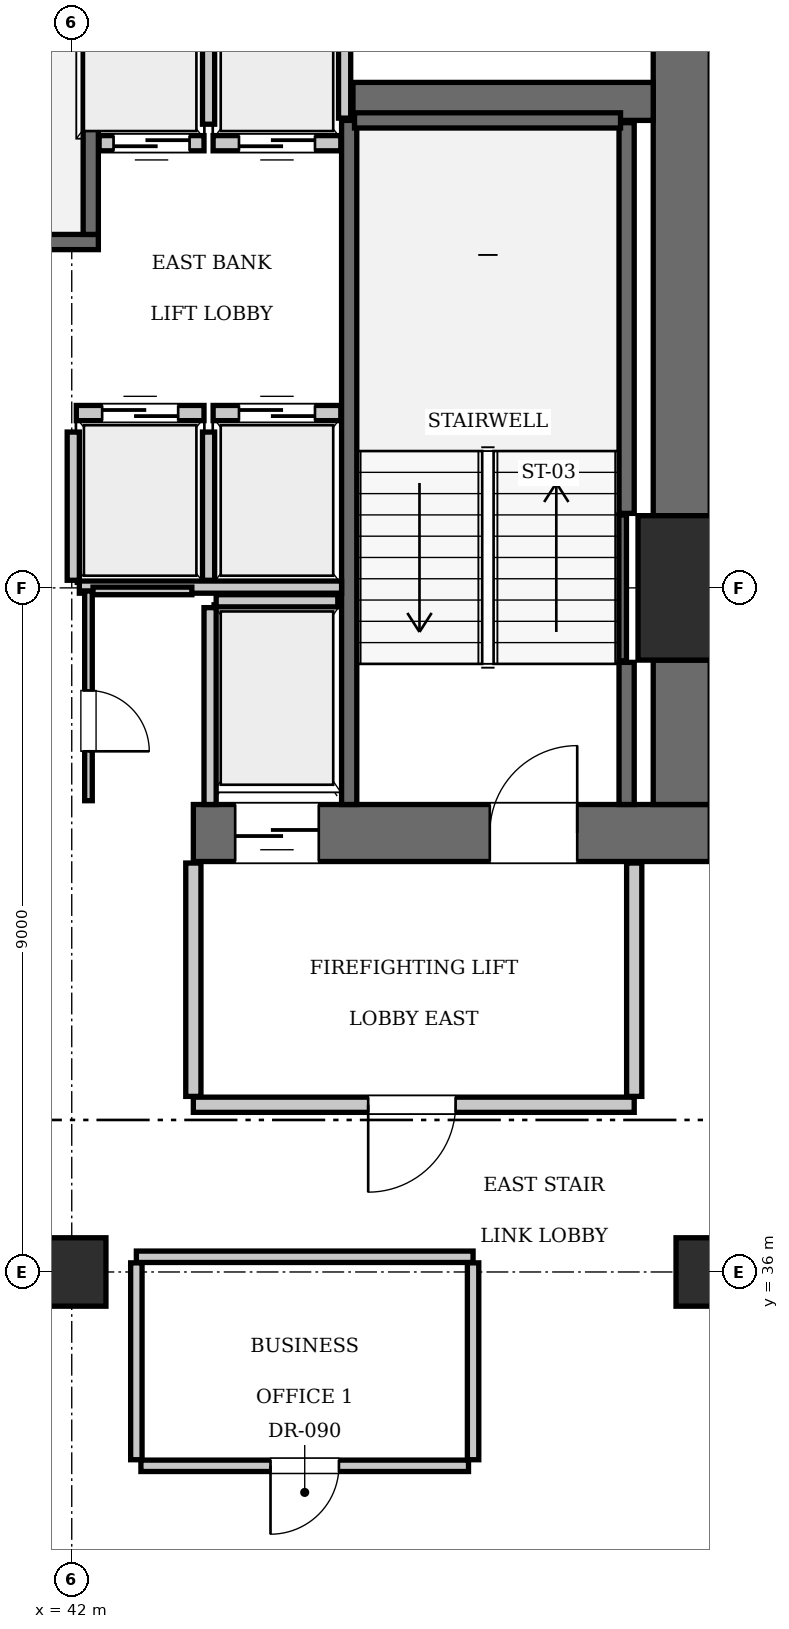
"""IFC4 building model, lengths in metres.
Left out: names, types, materials, properties, quantities, classifications, styles, units other than length and angle.
Written with IfcOpenShell. Run it as: python <this file> out.ifc"""

import sys

from ifc_helpers import new_model, si_unit, direction, frame, frame_2d, origin, origin_2d, place, context, subcontext, project, spatial, rectangle, extrude, element, fill, save


model = new_model("IFC4")
c1 = context("Model", 3, precision=1e-05, world=origin(), true_north=direction((0.0, 1.0)))
c2 = subcontext(c1, "Body", "Model", "MODEL_VIEW")
j1 = project(units=[si_unit("LENGTHUNIT", "METRE"), si_unit("PLANEANGLEUNIT", "RADIAN")], contexts=[c1])
p1 = place(None, origin())
s1 = spatial("IfcSite", under=j1, at=p1, CompositionType="ELEMENT")
p2 = place(p1, origin())
s2 = spatial("IfcBuilding", under=s1, at=p2, CompositionType="ELEMENT")
p3 = place(p2, frame((0.0, 0.0, 135.1)))
s3 = spatial("IfcBuildingStorey", under=s2, at=p3, CompositionType="ELEMENT", Elevation=135.1)
p4 = place(p3, frame((50.4, 45.0, 0.0), z_axis=(0.0, 0.0, 1.0), x_axis=(1.0, 0.0, 0.0)))
e1 = element("IfcColumn", 1, at=p4, inside=s3, PredefinedType="COLUMN", context=c2, shape_type="SweptSolid", body=[
    extrude(rectangle(XDim=1.9, YDim=1.9, at=origin_2d()), origin(), (0.0, 0.0, 1.0), 3.85),
])
p5 = place(p3, frame((43.6, 41.775, 0.0), z_axis=(0.0, 0.0, 1.0), x_axis=(1.0, 0.0, 0.0)))
e2 = element("IfcWall", 2, at=p5, inside=s3, PredefinedType="SHEAR", context=c2, shape_type="SweptSolid", body=[
    extrude(rectangle(XDim=6.8, YDim=0.75, at=frame_2d((3.4, 0.0))), origin(), (0.0, 0.0, 1.0), 3.85),
])
p6 = place(p5, frame((3.9, 0.0, 0.0)))
e3 = element("IfcOpeningElement", 3, at=p6, cuts=e2, PredefinedType="OPENING", context=c2, shape_type="SweptSolid", body=[
    extrude(rectangle(XDim=1.15, YDim=2.15, at=frame_2d((0.575, 1.075))), frame((0.0, 0.385, 0.0), z_axis=(0.0, -1.0, 0.0), x_axis=(1.0, 0.0, 0.0)), (0.0, 0.0, 1.0), 0.77),
])
p7 = place(p5, frame((0.55, 0.0, 0.0)))
e4 = element("IfcOpeningElement", 4, at=p7, cuts=e2, PredefinedType="OPENING", context=c2, shape_type="SweptSolid", body=[
    extrude(rectangle(XDim=1.1, YDim=2.2, at=frame_2d((0.55, 1.1))), frame((0.0, 0.385, 0.0), z_axis=(0.0, -1.0, 0.0), x_axis=(1.0, 0.0, 0.0)), (0.0, 0.0, 1.0), 0.77),
])
p8 = place(p3, frame((50.025, 42.15, 0.0), z_axis=(0.0, 0.0, 1.0), x_axis=(0.0, 1.0, 0.0)))
e5 = element("IfcWall", 5, at=p8, inside=s3, PredefinedType="SHEAR", context=c2, shape_type="SweptSolid", body=[
    extrude(rectangle(XDim=1.9, YDim=0.75, at=frame_2d((0.95, 0.0))), origin(), (0.0, 0.0, 1.0), 3.85),
])
p9 = place(p3, frame((50.025, 45.95, 0.0), z_axis=(0.0, 0.0, 1.0), x_axis=(0.0, 1.0, 0.0)))
e6 = element("IfcWall", 6, at=p9, inside=s3, PredefinedType="SHEAR", context=c2, shape_type="SweptSolid", body=[
    extrude(rectangle(XDim=7.3, YDim=0.75, at=frame_2d((3.65, 0.0))), origin(), (0.0, 0.0, 1.0), 3.85),
])
p10 = place(p3, frame((45.7, 51.4, 0.0), z_axis=(0.0, 0.0, 1.0), x_axis=(1.0, 0.0, 0.0)))
e7 = element("IfcWall", 7, at=p10, inside=s3, PredefinedType="SHEAR", context=c2, shape_type="SweptSolid", body=[
    extrude(rectangle(XDim=3.95, YDim=0.5, at=frame_2d((1.975, 0.0))), origin(), (0.0, 0.0, 1.0), 3.85),
])
for number, where, z_axis, x_axis in (
    (8, (42.0, 36.0, 0.0), (0.0, 0.0, 1.0), (1.0, 0.0, 0.0)),
    (9, (50.4, 36.0, 0.0), (0.0, 0.0, 1.0), (1.0, 0.0, 0.0)),
):
    element("IfcColumn", number, at=place(p3, frame(where, z_axis=z_axis, x_axis=x_axis)), inside=s3, PredefinedType="COLUMN", context=c2, shape_type="SweptSolid", body=[
        extrude(rectangle(XDim=0.9, YDim=0.9, at=origin_2d()), origin(), (0.0, 0.0, 1.0), 3.85),
    ])
p11 = place(p3, frame((33.25, 49.55, 0.0), z_axis=(0.0, 0.0, 1.0), x_axis=(1.0, 0.0, 0.0)))
e10 = element("IfcWall", 10, at=p11, inside=s3, PredefinedType="SOLIDWALL", context=c2, shape_type="SweptSolid", body=[
    extrude(rectangle(XDim=9.1, YDim=0.2, at=frame_2d((4.55, 0.0))), origin(), (0.0, 0.0, 1.0), 3.61),
])
p12 = place(p3, frame((42.25, 49.65, 0.0), z_axis=(0.0, 0.0, 1.0), x_axis=(0.0, 1.0, 0.0)))
e11 = element("IfcWall", 11, at=p12, inside=s3, PredefinedType="SOLIDWALL", context=c2, shape_type="SweptSolid", body=[
    extrude(rectangle(XDim=3.6, YDim=0.2, at=frame_2d((1.8, 0.0))), origin(), (0.0, 0.0, 1.0), 3.61),
])
p13 = place(p3, frame((45.65, 42.15, 0.0), z_axis=(0.0, 0.0, 1.0), x_axis=(0.0, 1.0, 0.0)))
e12 = element("IfcWall", 12, at=p13, inside=s3, PredefinedType="SOLIDWALL", context=c2, shape_type="SweptSolid", body=[
    extrude(rectangle(XDim=9.0, YDim=0.2, at=frame_2d((4.5, 0.0))), origin(), (0.0, 0.0, 1.0), 3.61),
])
p14 = place(p3, frame((49.3, 42.15, 0.0), z_axis=(0.0, 0.0, 1.0), x_axis=(0.0, 1.0, 0.0)))
e13 = element("IfcWall", 13, at=p14, inside=s3, PredefinedType="SOLIDWALL", context=c2, shape_type="SweptSolid", body=[
    extrude(rectangle(XDim=1.87, YDim=0.2, at=frame_2d((0.935, 0.0))), origin(), (0.0, 0.0, 1.0), 3.61),
])
p15 = place(p3, frame((49.3, 45.98, 0.0), z_axis=(0.0, 0.0, 1.0), x_axis=(0.0, 1.0, 0.0)))
e14 = element("IfcWall", 14, at=p15, inside=s3, PredefinedType="SOLIDWALL", context=c2, shape_type="SweptSolid", body=[
    extrude(rectangle(XDim=5.14, YDim=0.2, at=frame_2d((2.57, 0.0))), origin(), (0.0, 0.0, 1.0), 3.61),
])
p16 = place(p3, frame((45.72, 51.15, 0.0), z_axis=(0.0, 0.0, 1.0), x_axis=(1.0, 0.0, 0.0)))
e15 = element("IfcWall", 15, at=p16, inside=s3, PredefinedType="SOLIDWALL", context=c2, shape_type="SweptSolid", body=[
    extrude(rectangle(XDim=3.5, YDim=0.2, at=frame_2d((1.75, 0.0))), origin(), (0.0, 0.0, 1.0), 3.61),
])
p17 = place(p3, frame((49.248, 44.04, 0.0), z_axis=(0.0, 0.0, 1.0), x_axis=(0.0, 1.0, 0.0)))
e16 = element("IfcWall", 16, at=p17, inside=s3, PredefinedType="SOLIDWALL", context=c2, shape_type="SweptSolid", body=[
    extrude(rectangle(XDim=1.92, YDim=0.1, at=frame_2d((0.96, 0.0))), origin(), (0.0, 0.0, 1.0), 3.61),
])
p18 = place(p3, frame((42.06, 47.3, 0.0), z_axis=(0.0, 0.0, 1.0), x_axis=(1.0, 0.0, 0.0)))
e17 = element("IfcWall", 17, at=p18, inside=s3, PredefinedType="SOLIDWALL", context=c2, shape_type="SweptSolid", body=[
    extrude(rectangle(XDim=1.68, YDim=0.2, at=frame_2d((0.84, 0.0))), origin(), (0.0, 0.0, 1.0), 3.61),
])
p19 = place(p18, frame((0.34, 0.0, 0.0)))
e18 = element("IfcOpeningElement", 18, at=p19, cuts=e17, PredefinedType="OPENING", context=c2, shape_type="SweptSolid", body=[
    extrude(rectangle(XDim=1.0, YDim=2.15, at=frame_2d((0.5, 1.075))), frame((0.0, 0.11, 0.0), z_axis=(0.0, -1.0, 0.0), x_axis=(1.0, 0.0, 0.0)), (0.0, 0.0, 1.0), 0.22),
])
p20 = place(p3, frame((43.86, 47.3, 0.0), z_axis=(0.0, 0.0, 1.0), x_axis=(1.0, 0.0, 0.0)))
e19 = element("IfcWall", 19, at=p20, inside=s3, PredefinedType="SOLIDWALL", context=c2, shape_type="SweptSolid", body=[
    extrude(rectangle(XDim=1.68, YDim=0.2, at=frame_2d((0.84, 0.0))), origin(), (0.0, 0.0, 1.0), 3.61),
])
p21 = place(p20, frame((0.34, 0.0, 0.0)))
e20 = element("IfcOpeningElement", 20, at=p21, cuts=e19, PredefinedType="OPENING", context=c2, shape_type="SweptSolid", body=[
    extrude(rectangle(XDim=1.0, YDim=2.15, at=frame_2d((0.5, 1.075))), frame((0.0, 0.11, 0.0), z_axis=(0.0, -1.0, 0.0), x_axis=(1.0, 0.0, 0.0)), (0.0, 0.0, 1.0), 0.22),
])
p22 = place(p3, frame((42.36, 50.85, 0.0), z_axis=(0.0, 0.0, 1.0), x_axis=(1.0, 0.0, 0.0)))
e21 = element("IfcWall", 21, at=p22, inside=s3, PredefinedType="SOLIDWALL", context=c2, shape_type="SweptSolid", body=[
    extrude(rectangle(XDim=1.38, YDim=0.2, at=frame_2d((0.69, 0.0))), origin(), (0.0, 0.0, 1.0), 3.61),
])
p23 = place(p22, frame((0.19, 0.0, 0.0)))
e22 = element("IfcOpeningElement", 22, at=p23, cuts=e21, PredefinedType="OPENING", context=c2, shape_type="SweptSolid", body=[
    extrude(rectangle(XDim=1.0, YDim=2.15, at=frame_2d((0.5, 1.075))), frame((0.0, 0.11, 0.0), z_axis=(0.0, -1.0, 0.0), x_axis=(1.0, 0.0, 0.0)), (0.0, 0.0, 1.0), 0.22),
])
p24 = place(p3, frame((43.86, 50.85, 0.0), z_axis=(0.0, 0.0, 1.0), x_axis=(1.0, 0.0, 0.0)))
e23 = element("IfcWall", 23, at=p24, inside=s3, PredefinedType="SOLIDWALL", context=c2, shape_type="SweptSolid", body=[
    extrude(rectangle(XDim=1.68, YDim=0.2, at=frame_2d((0.84, 0.0))), origin(), (0.0, 0.0, 1.0), 3.61),
])
p25 = place(p24, frame((0.34, 0.0, 0.0)))
e24 = element("IfcOpeningElement", 24, at=p25, cuts=e23, PredefinedType="OPENING", context=c2, shape_type="SweptSolid", body=[
    extrude(rectangle(XDim=1.0, YDim=2.15, at=frame_2d((0.5, 1.075))), frame((0.0, 0.11, 0.0), z_axis=(0.0, -1.0, 0.0), x_axis=(1.0, 0.0, 0.0)), (0.0, 0.0, 1.0), 0.22),
])
p26 = place(p3, frame((43.9, 44.83, 0.0), z_axis=(0.0, 0.0, 1.0), x_axis=(1.0, 0.0, 0.0)))
e25 = element("IfcWall", 25, at=p26, inside=s3, PredefinedType="SOLIDWALL", context=c2, shape_type="SweptSolid", body=[
    extrude(rectangle(XDim=1.6, YDim=0.16, at=frame_2d((0.8, 0.0))), origin(), (0.0, 0.0, 1.0), 3.61),
])
p27 = place(p3, frame((43.82, 42.15, 0.0), z_axis=(0.0, 0.0, 1.0), x_axis=(0.0, 1.0, 0.0)))
e26 = element("IfcWall", 26, at=p27, inside=s3, PredefinedType="SOLIDWALL", context=c2, shape_type="SweptSolid", body=[
    extrude(rectangle(XDim=2.59, YDim=0.16, at=frame_2d((1.295, 0.0))), origin(), (0.0, 0.0, 1.0), 3.61),
])
for number, where, z_axis, x_axis in (
    (27, (42.02, 45.1, 0.0), (0.0, 0.0, 1.0), (0.0, 1.0, 0.0)),
    (28, (43.8, 45.1, 0.0), (0.0, 0.0, 1.0), (0.0, 1.0, 0.0)),
):
    element("IfcWall", number, at=place(p3, frame(where, z_axis=z_axis, x_axis=x_axis)), inside=s3, PredefinedType="SOLIDWALL", context=c2, shape_type="SweptSolid", body=[
        extrude(rectangle(XDim=1.95, YDim=0.16, at=frame_2d((0.975, 0.0))), origin(), (0.0, 0.0, 1.0), 3.61),
    ])
p28 = place(p3, frame((42.1, 45.01, 0.0), z_axis=(0.0, 0.0, 1.0), x_axis=(1.0, 0.0, 0.0)))
e29 = element("IfcWall", 29, at=p28, inside=s3, PredefinedType="SOLIDWALL", context=c2, shape_type="SweptSolid", body=[
    extrude(rectangle(XDim=3.45, YDim=0.16, at=frame_2d((1.725, 0.0))), origin(), (0.0, 0.0, 1.0), 3.61),
])
p29 = place(p3, frame((45.59, 51.18, 0.0), z_axis=(0.0, 0.0, 1.0), x_axis=(0.0, 1.0, 0.0)))
e30 = element("IfcWall", 30, at=p29, inside=s3, PredefinedType="SOLIDWALL", context=c2, shape_type="SweptSolid", body=[
    extrude(rectangle(XDim=2.07, YDim=0.16, at=frame_2d((1.035, 0.0))), origin(), (0.0, 0.0, 1.0), 3.61),
])
p30 = place(p3, frame((43.8, 51.1, 0.0), z_axis=(0.0, 0.0, 1.0), x_axis=(0.0, 1.0, 0.0)))
e31 = element("IfcWall", 31, at=p30, inside=s3, PredefinedType="SOLIDWALL", context=c2, shape_type="SweptSolid", body=[
    extrude(rectangle(XDim=2.15, YDim=0.16, at=frame_2d((1.075, 0.0))), origin(), (0.0, 0.0, 1.0), 3.61),
])
p31 = place(p3, frame((43.6, 38.2, 0.0), z_axis=(0.0, 0.0, 1.0), x_axis=(1.0, 0.0, 0.0)))
e32 = element("IfcWall", 32, at=p31, inside=s3, PredefinedType="PARTITIONING", context=c2, shape_type="SweptSolid", body=[
    extrude(rectangle(XDim=5.8, YDim=0.2, at=frame_2d((2.9, 0.0))), origin(), (0.0, 0.0, 1.0), 3.61),
])
p32 = place(p31, frame((2.3, 0.0, 0.0)))
e33 = element("IfcOpeningElement", 33, at=p32, cuts=e32, PredefinedType="OPENING", context=c2, shape_type="SweptSolid", body=[
    extrude(rectangle(XDim=1.15, YDim=2.15, at=frame_2d((0.575, 1.075))), frame((0.0, 0.11, 0.0), z_axis=(0.0, -1.0, 0.0), x_axis=(1.0, 0.0, 0.0)), (0.0, 0.0, 1.0), 0.22),
])
for number, where, z_axis, x_axis in (
    (34, (43.6, 38.31, 0.0), (0.0, 0.0, 1.0), (0.0, 1.0, 0.0)),
    (35, (49.4, 38.31, 0.0), (0.0, 0.0, 1.0), (0.0, 1.0, 0.0)),
):
    element("IfcWall", number, at=place(p3, frame(where, z_axis=z_axis, x_axis=x_axis)), inside=s3, PredefinedType="PARTITIONING", context=c2, shape_type="SweptSolid", body=[
        extrude(rectangle(XDim=3.07, YDim=0.2, at=frame_2d((1.535, 0.0))), origin(), (0.0, 0.0, 1.0), 3.61),
    ])
p33 = place(p3, frame((42.22, 42.2, 0.0), z_axis=(0.0, 0.0, 1.0), x_axis=(0.0, 1.0, 0.0)))
e36 = element("IfcWall", 36, at=p33, inside=s3, PredefinedType="PARTITIONING", context=c2, shape_type="SweptSolid", body=[
    extrude(rectangle(XDim=2.76, YDim=0.1, at=frame_2d((1.38, 0.0))), origin(), (0.0, 0.0, 1.0), 3.61),
])
p34 = place(p33, frame((0.65, 0.0, 0.0)))
e37 = element("IfcOpeningElement", 37, at=p34, cuts=e36, PredefinedType="OPENING", context=c2, shape_type="SweptSolid", body=[
    extrude(rectangle(XDim=0.8, YDim=2.05, at=frame_2d((0.4, 1.025))), frame((0.0, 0.06, 0.0), z_axis=(0.0, -1.0, 0.0), x_axis=(1.0, 0.0, 0.0)), (0.0, 0.0, 1.0), 0.12),
])
p35 = place(p3, frame((42.28, 44.96, 0.0), z_axis=(0.0, 0.0, 1.0), x_axis=(1.0, 0.0, 0.0)))
e38 = element("IfcWall", 38, at=p35, inside=s3, PredefinedType="PARTITIONING", context=c2, shape_type="SweptSolid", body=[
    extrude(rectangle(XDim=1.3, YDim=0.1, at=frame_2d((0.65, 0.0))), origin(), (0.0, 0.0, 1.0), 3.61),
])
p36 = place(p3, frame((42.85, 36.2, 0.0), z_axis=(0.0, 0.0, 1.0), x_axis=(1.0, 0.0, 0.0)))
e39 = element("IfcWall", 39, at=p36, inside=s3, PredefinedType="PARTITIONING", context=c2, shape_type="SweptSolid", body=[
    extrude(rectangle(XDim=4.43, YDim=0.15, at=frame_2d((2.215, 0.0))), origin(), (0.0, 0.0, 1.0), 3.61),
])
for number, where, z_axis, x_axis in (
    (40, (42.85, 33.53, 0.0), (0.0, 0.0, 1.0), (0.0, 1.0, 0.0)),
    (41, (47.28, 33.53, 0.0), (0.0, 0.0, 1.0), (0.0, 1.0, 0.0)),
):
    element("IfcWall", number, at=place(p3, frame(where, z_axis=z_axis, x_axis=x_axis)), inside=s3, PredefinedType="PARTITIONING", context=c2, shape_type="SweptSolid", body=[
        extrude(rectangle(XDim=2.59, YDim=0.15, at=frame_2d((1.295, 0.0))), origin(), (0.0, 0.0, 1.0), 3.61),
    ])
p37 = place(p3, frame((42.91, 33.45, 0.0), z_axis=(0.0, 0.0, 1.0), x_axis=(1.0, 0.0, 0.0)))
e42 = element("IfcWall", 42, at=p37, inside=s3, PredefinedType="PARTITIONING", context=c2, shape_type="SweptSolid", body=[
    extrude(rectangle(XDim=4.31, YDim=0.15, at=frame_2d((2.155, 0.0))), origin(), (0.0, 0.0, 1.0), 3.61),
])
p38 = place(p37, frame((1.705, 0.0, 0.0)))
e43 = element("IfcOpeningElement", 43, at=p38, cuts=e42, PredefinedType="OPENING", context=c2, shape_type="SweptSolid", body=[
    extrude(rectangle(XDim=0.9, YDim=2.1, at=frame_2d((0.45, 1.05))), frame((0.0, 0.085, 0.0), z_axis=(0.0, -1.0, 0.0), x_axis=(1.0, 0.0, 0.0)), (0.0, 0.0, 1.0), 0.17),
])
p39 = place(p6, origin())
e44 = element("IfcDoor", 44, at=p39, inside=s3, OperationType="SINGLE_SWING_RIGHT", PredefinedType="DOOR", context=c2, shape_type="SweptSolid", body=[
    extrude(rectangle(XDim=1.15, YDim=2.15, at=frame_2d((0.575, 1.075))), frame((0.0, 0.025, 0.0), z_axis=(0.0, -1.0, 0.0), x_axis=(1.0, 0.0, 0.0)), (0.0, 0.0, 1.0), 0.05),
])
fill(e3, e44)
p40 = place(p19, origin())
e45 = element("IfcDoor", 45, at=p40, inside=s3, OperationType="SLIDING_TO_LEFT", PredefinedType="DOOR", context=c2, shape_type="SweptSolid", body=[
    extrude(rectangle(XDim=1.0, YDim=2.15, at=frame_2d((0.5, 1.075))), frame((0.0, 0.025, 0.0), z_axis=(0.0, -1.0, 0.0), x_axis=(1.0, 0.0, 0.0)), (0.0, 0.0, 1.0), 0.05),
])
fill(e18, e45)
p41 = place(p21, origin())
e46 = element("IfcDoor", 46, at=p41, inside=s3, OperationType="SLIDING_TO_LEFT", PredefinedType="DOOR", context=c2, shape_type="SweptSolid", body=[
    extrude(rectangle(XDim=1.0, YDim=2.15, at=frame_2d((0.5, 1.075))), frame((0.0, 0.025, 0.0), z_axis=(0.0, -1.0, 0.0), x_axis=(1.0, 0.0, 0.0)), (0.0, 0.0, 1.0), 0.05),
])
fill(e20, e46)
p42 = place(p23, frame((1.0, 0.0, 0.0), z_axis=(0.0, 0.0, 1.0), x_axis=(-1.0, 0.0, 0.0)))
e47 = element("IfcDoor", 47, at=p42, inside=s3, OperationType="SLIDING_TO_LEFT", PredefinedType="DOOR", context=c2, shape_type="SweptSolid", body=[
    extrude(rectangle(XDim=1.0, YDim=2.15, at=frame_2d((0.5, 1.075))), frame((0.0, 0.025, 0.0), z_axis=(0.0, -1.0, 0.0), x_axis=(1.0, 0.0, 0.0)), (0.0, 0.0, 1.0), 0.05),
])
fill(e22, e47)
p43 = place(p25, frame((1.0, 0.0, 0.0), z_axis=(0.0, 0.0, 1.0), x_axis=(-1.0, 0.0, 0.0)))
e48 = element("IfcDoor", 48, at=p43, inside=s3, OperationType="SLIDING_TO_LEFT", PredefinedType="DOOR", context=c2, shape_type="SweptSolid", body=[
    extrude(rectangle(XDim=1.0, YDim=2.15, at=frame_2d((0.5, 1.075))), frame((0.0, 0.025, 0.0), z_axis=(0.0, -1.0, 0.0), x_axis=(1.0, 0.0, 0.0)), (0.0, 0.0, 1.0), 0.05),
])
fill(e24, e48)
p44 = place(p7, frame((1.1, 0.0, 0.0), z_axis=(0.0, 0.0, 1.0), x_axis=(-1.0, 0.0, 0.0)))
e49 = element("IfcDoor", 49, at=p44, inside=s3, OperationType="SLIDING_TO_LEFT", PredefinedType="DOOR", context=c2, shape_type="SweptSolid", body=[
    extrude(rectangle(XDim=1.1, YDim=2.2, at=frame_2d((0.55, 1.1))), frame((0.0, 0.025, 0.0), z_axis=(0.0, -1.0, 0.0), x_axis=(1.0, 0.0, 0.0)), (0.0, 0.0, 1.0), 0.05),
])
fill(e4, e49)
p45 = place(p32, frame((1.15, 0.0, 0.0), z_axis=(0.0, 0.0, 1.0), x_axis=(-1.0, 0.0, 0.0)))
e50 = element("IfcDoor", 50, at=p45, inside=s3, OperationType="SINGLE_SWING_RIGHT", PredefinedType="DOOR", context=c2, shape_type="SweptSolid", body=[
    extrude(rectangle(XDim=1.15, YDim=2.15, at=frame_2d((0.575, 1.075))), frame((0.0, 0.025, 0.0), z_axis=(0.0, -1.0, 0.0), x_axis=(1.0, 0.0, 0.0)), (0.0, 0.0, 1.0), 0.05),
])
fill(e33, e50)
p46 = place(p34, frame((0.8, 0.0, 0.0), z_axis=(0.0, 0.0, 1.0), x_axis=(-1.0, 0.0, 0.0)))
e51 = element("IfcDoor", 51, at=p46, inside=s3, OperationType="SINGLE_SWING_RIGHT", PredefinedType="DOOR", context=c2, shape_type="SweptSolid", body=[
    extrude(rectangle(XDim=0.8, YDim=2.05, at=frame_2d((0.4, 1.025))), frame((0.0, 0.025, 0.0), z_axis=(0.0, -1.0, 0.0), x_axis=(1.0, 0.0, 0.0)), (0.0, 0.0, 1.0), 0.05),
])
fill(e37, e51)
p47 = place(p38, frame((0.9, 0.0, 0.0), z_axis=(0.0, 0.0, 1.0), x_axis=(-1.0, 0.0, 0.0)))
e52 = element("IfcDoor", 52, at=p47, inside=s3, OperationType="SINGLE_SWING_RIGHT", PredefinedType="DOOR", context=c2, shape_type="SweptSolid", body=[
    extrude(rectangle(XDim=0.9, YDim=2.1, at=frame_2d((0.45, 1.05))), frame((0.0, 0.025, 0.0), z_axis=(0.0, -1.0, 0.0), x_axis=(1.0, 0.0, 0.0)), (0.0, 0.0, 1.0), 0.05),
])
fill(e43, e52)
save(model, sys.argv[1])
